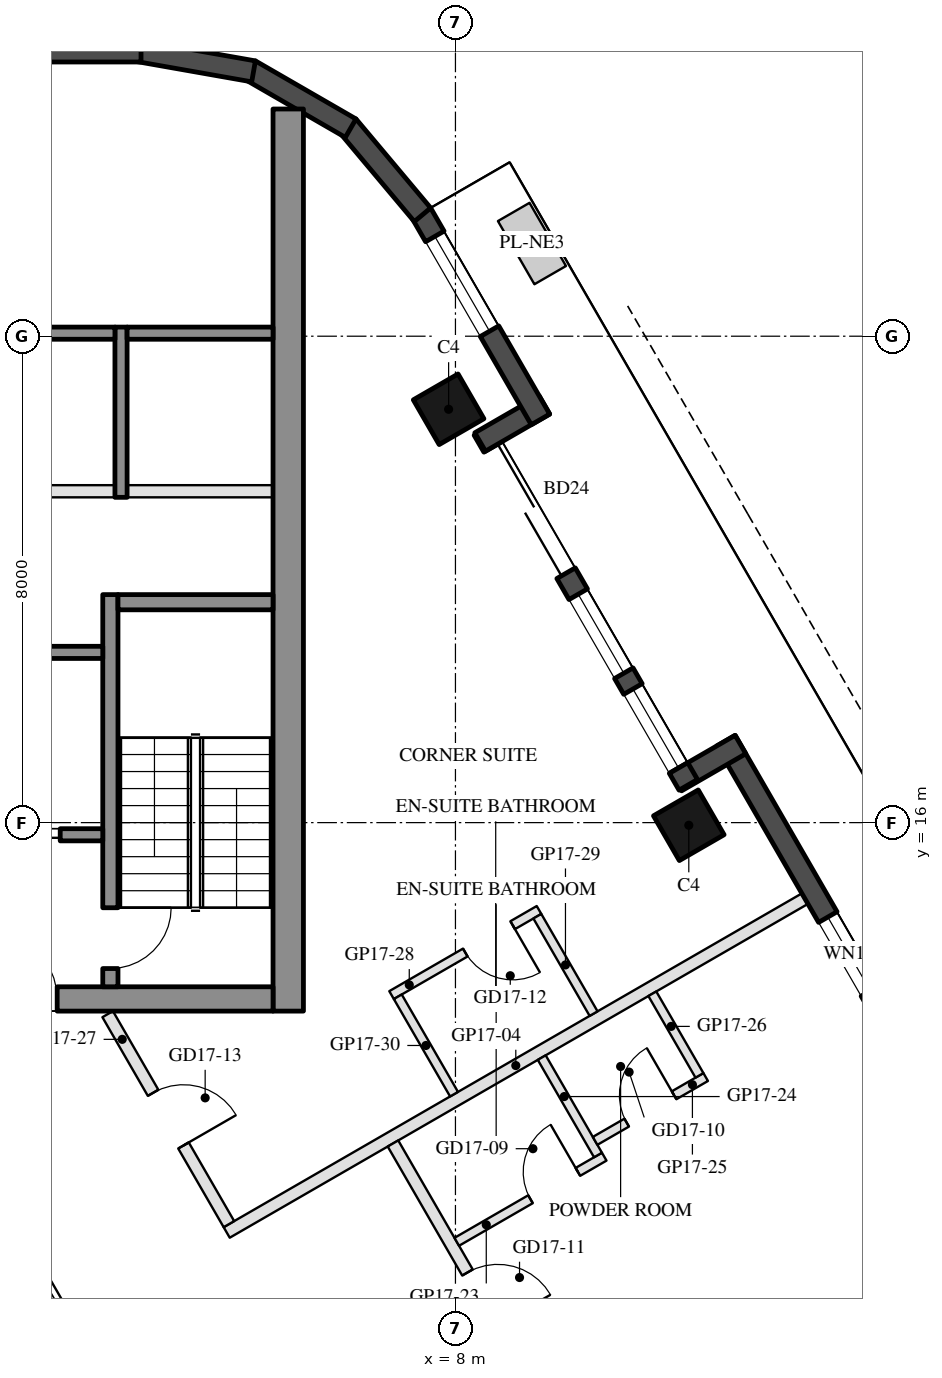
"""IFC4 building model, lengths in metres.
Left out: names, types, materials, properties, quantities, classifications, styles, units other than length and angle.
Written with IfcOpenShell. Run it as: python <this file> out.ifc"""

import sys

from ifc_helpers import new_model, si_unit, direction, frame, frame_2d, origin, origin_2d, place, context, subcontext, project, spatial, rectangle, hollow_rectangle, extrude, element, fill, save


model = new_model("IFC4")
c1 = context("Model", 3, precision=1e-05, world=origin(), true_north=direction((0.0, 1.0)))
c2 = subcontext(c1, "Body", "Model", "MODEL_VIEW")
j1 = project(units=[si_unit("LENGTHUNIT", "METRE"), si_unit("PLANEANGLEUNIT", "RADIAN")], contexts=[c1])
p1 = place(None, origin())
s1 = spatial("IfcSite", under=j1, at=p1, CompositionType="ELEMENT")
p2 = place(p1, origin())
s2 = spatial("IfcBuilding", under=s1, at=p2, CompositionType="ELEMENT")
p3 = place(p2, frame((0.0, 0.0, 183.6)))
s3 = spatial("IfcBuildingStorey", under=s2, at=p3, CompositionType="ELEMENT", Elevation=183.6)
for number, where, z_axis, x_axis in (
    (1, (11.838, 15.957, 0.0), (0.0, 0.0, 1.0), (-0.5, 0.866, 0.0)),
    (2, (7.888, 22.798, 0.0), (0.0, 0.0, 1.0), (-0.5, 0.866, 0.0)),
):
    element("IfcColumn", number, at=place(p3, frame(where, z_axis=z_axis, x_axis=x_axis)), inside=s3, PredefinedType="COLUMN", context=c2, shape_type="SweptSolid", body=[
        extrude(hollow_rectangle(XDim=0.85, YDim=0.85, WallThickness=0.04, at=origin_2d()), origin(), (0.0, 0.0, 1.0), 3.7),
    ])
p4 = place(p3, frame((17.299, 8.948, 0.0), z_axis=(0.0, 0.0, 1.0), x_axis=(-0.500010041276, 0.866019606374, 0.0)))
e3 = element("IfcWall", 3, at=p4, inside=s3, PredefinedType="SOLIDWALL", context=c2, shape_type="SweptSolid", body=[
    extrude(rectangle(XDim=9.7, YDim=0.35, at=frame_2d((4.85, 0.0))), origin(), (0.0, 0.0, 1.0), 3.55),
])
p5 = place(p4, frame((1.675, 0.0, 0.3)))
e4 = element("IfcOpeningElement", 4, at=p5, cuts=e3, PredefinedType="OPENING", context=c2, shape_type="SweptSolid", body=[
    extrude(rectangle(XDim=2.5, YDim=2.65, at=frame_2d((1.25, 1.325))), frame((0.0, 0.185, 0.0), z_axis=(0.0, -1.0, 0.0), x_axis=(1.0, 0.0, 0.0)), (0.0, 0.0, 1.0), 0.37),
])
p6 = place(p4, frame((4.949, 0.0, 0.3)))
e5 = element("IfcOpeningElement", 5, at=p6, cuts=e3, PredefinedType="OPENING", context=c2, shape_type="SweptSolid", body=[
    extrude(rectangle(XDim=1.4, YDim=2.65, at=frame_2d((0.7, 1.325))), frame((0.0, 0.185, 0.0), z_axis=(0.0, -1.0, 0.0), x_axis=(1.0, 0.0, 0.0)), (0.0, 0.0, 1.0), 0.37),
])
p7 = place(p3, frame((12.688, 17.284, 0.0), z_axis=(0.0, 0.0, 1.0), x_axis=(-0.865955602162, -0.500120880472, 0.0)))
e6 = element("IfcWall", 6, at=p7, inside=s3, PredefinedType="SOLIDWALL", context=c2, shape_type="SweptSolid", body=[
    extrude(rectangle(XDim=1.22, YDim=0.35, at=frame_2d((0.61, 0.0))), origin(), (0.0, 0.0, 1.0), 3.55),
])
p8 = place(p3, frame((11.829, 16.621, 0.0), z_axis=(0.0, 0.0, 1.0), x_axis=(-0.500003597184, 0.866023326939, 0.0)))
e7 = element("IfcWall", 7, at=p8, inside=s3, PredefinedType="SOLIDWALL", context=c2, shape_type="SweptSolid", body=[
    extrude(rectangle(XDim=6.74, YDim=0.35, at=frame_2d((3.37, 0.0))), origin(), (0.0, 0.0, 1.0), 3.55),
])
p9 = place(p8, frame((4.02, 0.0, 0.0)))
e8 = element("IfcOpeningElement", 8, at=p9, cuts=e7, PredefinedType="OPENING", context=c2, shape_type="SweptSolid", body=[
    extrude(rectangle(XDim=2.4, YDim=2.4, at=frame_2d((1.2, 1.2))), frame((0.0, 0.185, 0.0), z_axis=(0.0, -1.0, 0.0), x_axis=(1.0, 0.0, 0.0)), (0.0, 0.0, 1.0), 0.37),
])
p10 = place(p8, frame((0.32, 0.0, 0.3)))
e9 = element("IfcOpeningElement", 9, at=p10, cuts=e7, PredefinedType="OPENING", context=c2, shape_type="SweptSolid", body=[
    extrude(rectangle(XDim=1.5, YDim=2.65, at=frame_2d((0.75, 1.325))), frame((0.0, 0.185, 0.0), z_axis=(0.0, -1.0, 0.0), x_axis=(1.0, 0.0, 0.0)), (0.0, 0.0, 1.0), 0.37),
])
p11 = place(p8, frame((2.12, 0.0, 0.3)))
e10 = element("IfcOpeningElement", 10, at=p11, cuts=e7, PredefinedType="OPENING", context=c2, shape_type="SweptSolid", body=[
    extrude(rectangle(XDim=1.5, YDim=2.65, at=frame_2d((0.75, 1.325))), frame((0.0, 0.185, 0.0), z_axis=(0.0, -1.0, 0.0), x_axis=(1.0, 0.0, 0.0)), (0.0, 0.0, 1.0), 0.37),
])
p12 = place(p3, frame((8.406, 22.26, 0.0), z_axis=(0.0, 0.0, 1.0), x_axis=(0.865955602162, 0.500120880472, 0.0)))
e11 = element("IfcWall", 11, at=p12, inside=s3, PredefinedType="SOLIDWALL", context=c2, shape_type="SweptSolid", body=[
    extrude(rectangle(XDim=1.22, YDim=0.35, at=frame_2d((0.61, 0.0))), origin(), (0.0, 0.0, 1.0), 3.55),
])
p13 = place(p3, frame((9.398, 22.631, 0.0), z_axis=(0.0, 0.0, 1.0), x_axis=(-0.499954521343, 0.866051659307, 0.0)))
e12 = element("IfcWall", 12, at=p13, inside=s3, PredefinedType="SOLIDWALL", context=c2, shape_type="SweptSolid", body=[
    extrude(rectangle(XDim=3.916, YDim=0.35, at=frame_2d((1.958, 0.0))), origin(), (0.0, 0.0, 1.0), 3.55),
])
p14 = place(p13, frame((1.675, 0.0, 0.3)))
e13 = element("IfcOpeningElement", 13, at=p14, cuts=e12, PredefinedType="OPENING", context=c2, shape_type="SweptSolid", body=[
    extrude(rectangle(XDim=1.8, YDim=2.65, at=frame_2d((0.9, 1.325))), frame((0.0, 0.185, 0.0), z_axis=(0.0, -1.0, 0.0), x_axis=(1.0, 0.0, 0.0)), (0.0, 0.0, 1.0), 0.37),
])
p15 = place(p3, frame((7.458, 25.998, 0.0), z_axis=(0.0, 0.0, 1.0), x_axis=(-0.642808304945, 0.766027077259, 0.0)))
e14 = element("IfcWall", 14, at=p15, inside=s3, PredefinedType="SOLIDWALL", context=c2, shape_type="SweptSolid", body=[
    extrude(rectangle(XDim=1.91, YDim=0.35, at=frame_2d((0.955, 0.0))), origin(), (0.0, 0.0, 1.0), 3.55),
])
for number, where, z_axis, x_axis in (
    (15, (6.277, 27.422, 0.0), (0.0, 0.0, 1.0), (-0.866, 0.5, 0.0)),
    (16, (4.68, 28.356, 0.0), (0.0, 0.0, 1.0), (-0.985, 0.174, 0.0)),
):
    element("IfcWall", number, at=place(p3, frame(where, z_axis=z_axis, x_axis=x_axis)), inside=s3, PredefinedType="SOLIDWALL", context=c2, shape_type="SweptSolid", body=[
        extrude(rectangle(XDim=1.91, YDim=0.35, at=frame_2d((0.955, 0.0))), origin(), (0.0, 0.0, 1.0), 3.55),
    ])
p16 = place(p3, frame((2.829, 28.685, 0.0), z_axis=(0.0, 0.0, 1.0), x_axis=(-1.0, 0.0, 0.0)))
e17 = element("IfcWall", 17, at=p16, inside=s3, PredefinedType="SOLIDWALL", context=c2, shape_type="SweptSolid", body=[
    extrude(rectangle(XDim=5.658, YDim=0.35, at=frame_2d((2.829, 0.0))), origin(), (0.0, 0.0, 1.0), 3.55),
])
p17 = place(p3, frame((5.25, 12.9, 0.0), z_axis=(0.0, 0.0, 1.0), x_axis=(0.0, 1.0, 0.0)))
e18 = element("IfcWall", 18, at=p17, inside=s3, PredefinedType="SHEAR", context=c2, shape_type="SweptSolid", body=[
    extrude(rectangle(XDim=14.837, YDim=0.5, at=frame_2d((7.418, 0.0))), origin(), (0.0, 0.0, 1.0), 3.5),
])
p18 = place(p3, frame((5.0, 13.1, 0.0), z_axis=(0.0, 0.0, 1.0), x_axis=(-1.0, 0.0, 0.0)))
e19 = element("IfcWall", 19, at=p18, inside=s3, PredefinedType="SHEAR", context=c2, shape_type="SweptSolid", body=[
    extrude(rectangle(XDim=10.0, YDim=0.4, at=frame_2d((5.0, 0.0))), origin(), (0.0, 0.0, 1.0), 3.5),
])
p19 = place(p18, frame((3.55, 0.0, 0.0)))
e20 = element("IfcOpeningElement", 20, at=p19, cuts=e19, PredefinedType="OPENING", context=c2, shape_type="SweptSolid", body=[
    extrude(rectangle(XDim=1.1, YDim=2.1, at=frame_2d((0.55, 1.05))), frame((0.0, 0.21, 0.0), z_axis=(0.0, -1.0, 0.0), x_axis=(1.0, 0.0, 0.0)), (0.0, 0.0, 1.0), 0.42),
])
p20 = place(p18, frame((5.85, 0.0, 0.0)))
e21 = element("IfcOpeningElement", 21, at=p20, cuts=e19, PredefinedType="OPENING", context=c2, shape_type="SweptSolid", body=[
    extrude(rectangle(XDim=1.4, YDim=2.1, at=frame_2d((0.7, 1.05))), frame((0.0, 0.21, 0.0), z_axis=(0.0, -1.0, 0.0), x_axis=(1.0, 0.0, 0.0)), (0.0, 0.0, 1.0), 0.42),
])
p21 = place(p3, frame((2.325, 13.3, 0.0), z_axis=(0.0, 0.0, 1.0), x_axis=(0.0, 1.0, 0.0)))
e22 = element("IfcWall", 22, at=p21, inside=s3, PredefinedType="SHEAR", context=c2, shape_type="SweptSolid", body=[
    extrude(rectangle(XDim=6.45, YDim=0.25, at=frame_2d((3.225, 0.0))), origin(), (0.0, 0.0, 1.0), 3.5),
])
p22 = place(p21, frame((0.3, 0.0, 0.0)))
e23 = element("IfcOpeningElement", 23, at=p22, cuts=e22, PredefinedType="OPENING", context=c2, shape_type="SweptSolid", body=[
    extrude(rectangle(XDim=1.0, YDim=2.1, at=frame_2d((0.5, 1.05))), frame((0.0, 0.135, 0.0), z_axis=(0.0, -1.0, 0.0), x_axis=(1.0, 0.0, 0.0)), (0.0, 0.0, 1.0), 0.27),
])
p23 = place(p3, frame((5.0, 19.625, 0.0), z_axis=(0.0, 0.0, 1.0), x_axis=(-1.0, 0.0, 0.0)))
e24 = element("IfcWall", 24, at=p23, inside=s3, PredefinedType="SHEAR", context=c2, shape_type="SweptSolid", body=[
    extrude(rectangle(XDim=2.55, YDim=0.25, at=frame_2d((1.275, 0.0))), origin(), (0.0, 0.0, 1.0), 3.5),
])
p24 = place(p3, frame((2.2, 18.8, 0.0), z_axis=(0.0, 0.0, 1.0), x_axis=(-1.0, 0.0, 0.0)))
e25 = element("IfcWall", 25, at=p24, inside=s3, PredefinedType="SHEAR", context=c2, shape_type="SweptSolid", body=[
    extrude(rectangle(XDim=2.8, YDim=0.2, at=frame_2d((1.4, 0.0))), origin(), (0.0, 0.0, 1.0), 3.5),
])
p25 = place(p3, frame((2.2, 15.8, 0.0), z_axis=(0.0, 0.0, 1.0), x_axis=(-1.0, 0.0, 0.0)))
e26 = element("IfcWall", 26, at=p25, inside=s3, PredefinedType="SHEAR", context=c2, shape_type="SweptSolid", body=[
    extrude(rectangle(XDim=2.8, YDim=0.2, at=frame_2d((1.4, 0.0))), origin(), (0.0, 0.0, 1.0), 3.5),
])
p26 = place(p25, frame((0.7, 0.0, 0.0)))
e27 = element("IfcOpeningElement", 27, at=p26, cuts=e26, PredefinedType="OPENING", context=c2, shape_type="SweptSolid", body=[
    extrude(rectangle(XDim=1.2, YDim=2.1, at=frame_2d((0.6, 1.05))), frame((0.0, 0.11, 0.0), z_axis=(0.0, -1.0, 0.0), x_axis=(1.0, 0.0, 0.0)), (0.0, 0.0, 1.0), 0.22),
])
p27 = place(p3, frame((2.5, 21.35, 0.0), z_axis=(0.0, 0.0, 1.0), x_axis=(0.0, 1.0, 0.0)))
e28 = element("IfcWall", 28, at=p27, inside=s3, PredefinedType="SHEAR", context=c2, shape_type="SweptSolid", body=[
    extrude(rectangle(XDim=2.8, YDim=0.2, at=frame_2d((1.4, 0.0))), origin(), (0.0, 0.0, 1.0), 3.5),
])
p28 = place(p3, frame((5.0, 24.05, 0.0), z_axis=(0.0, 0.0, 1.0), x_axis=(-1.0, 0.0, 0.0)))
e29 = element("IfcWall", 29, at=p28, inside=s3, PredefinedType="SHEAR", context=c2, shape_type="SweptSolid", body=[
    extrude(rectangle(XDim=2.4, YDim=0.2, at=frame_2d((1.2, 0.0))), origin(), (0.0, 0.0, 1.0), 3.5),
])
p29 = place(p3, frame((2.4, 24.05, 0.0), z_axis=(0.0, 0.0, 1.0), x_axis=(-1.0, 0.0, 0.0)))
e30 = element("IfcWall", 30, at=p29, inside=s3, PredefinedType="SHEAR", context=c2, shape_type="SweptSolid", body=[
    extrude(rectangle(XDim=2.8, YDim=0.2, at=frame_2d((1.4, 0.0))), origin(), (0.0, 0.0, 1.0), 3.5),
])
p30 = place(p3, frame((5.0, 21.45, 0.0), z_axis=(0.0, 0.0, 1.0), x_axis=(-1.0, 0.0, 0.0)))
e31 = element("IfcWall", 31, at=p30, inside=s3, PredefinedType="PARTITIONING", context=c2, shape_type="SweptSolid", body=[
    extrude(rectangle(XDim=2.4, YDim=0.2, at=frame_2d((1.2, 0.0))), origin(), (0.0, 0.0, 1.0), 3.5),
])
p31 = place(p3, frame((2.4, 21.45, 0.0), z_axis=(0.0, 0.0, 1.0), x_axis=(-1.0, 0.0, 0.0)))
e32 = element("IfcWall", 32, at=p31, inside=s3, PredefinedType="PARTITIONING", context=c2, shape_type="SweptSolid", body=[
    extrude(rectangle(XDim=2.8, YDim=0.2, at=frame_2d((1.4, 0.0))), origin(), (0.0, 0.0, 1.0), 3.5),
])
p32 = place(p3, frame((13.747, 14.75, 0.0), z_axis=(0.0, 0.0, 1.0), x_axis=(-0.866027479907, -0.499996404033, 0.0)))
e33 = element("IfcWall", 33, at=p32, inside=s3, PredefinedType="PARTITIONING", context=c2, shape_type="SweptSolid", body=[
    extrude(rectangle(XDim=10.98, YDim=0.2, at=frame_2d((5.49, 0.0))), origin(), (0.0, 0.0, 1.0), 3.06),
])
p33 = place(p3, frame((6.973, 10.723, 0.0), z_axis=(0.0, 0.0, 1.0), x_axis=(0.500000207062, -0.866025284237, 0.0)))
e34 = element("IfcWall", 34, at=p33, inside=s3, PredefinedType="PARTITIONING", context=c2, shape_type="SweptSolid", body=[
    extrude(rectangle(XDim=10.5, YDim=0.2, at=frame_2d((5.25, 0.0))), origin(), (0.0, 0.0, 1.0), 2.95),
])
p34 = place(p33, frame((2.45, 0.0, 0.0)))
e35 = element("IfcOpeningElement", 35, at=p34, cuts=e34, PredefinedType="OPENING", context=c2, shape_type="SweptSolid", body=[
    extrude(rectangle(XDim=1.0, YDim=2.1, at=frame_2d((0.5, 1.05))), frame((0.0, 0.11, 0.0), z_axis=(0.0, -1.0, 0.0), x_axis=(1.0, 0.0, 0.0)), (0.0, 0.0, 1.0), 0.22),
])
p35 = place(p3, frame((8.022, 9.106, 0.0), z_axis=(0.0, 0.0, 1.0), x_axis=(0.866018616679, 0.500011755427, 0.0)))
e36 = element("IfcWall", 36, at=p35, inside=s3, PredefinedType="PARTITIONING", context=c2, shape_type="SweptSolid", body=[
    extrude(rectangle(XDim=2.8, YDim=0.15, at=frame_2d((1.4, 0.0))), origin(), (0.0, 0.0, 1.0), 2.95),
])
p36 = place(p35, frame((1.4, 0.0, 0.0)))
e37 = element("IfcOpeningElement", 37, at=p36, cuts=e36, PredefinedType="OPENING", context=c2, shape_type="SweptSolid", body=[
    extrude(rectangle(XDim=0.9, YDim=2.1, at=frame_2d((0.45, 1.05))), frame((0.0, 0.085, 0.0), z_axis=(0.0, -1.0, 0.0), x_axis=(1.0, 0.0, 0.0)), (0.0, 0.0, 1.0), 0.17),
])
p37 = place(p3, frame((10.344, 10.533, 0.0), z_axis=(0.0, 0.0, 1.0), x_axis=(-0.499985172903, 0.866033964044, 0.0)))
e38 = element("IfcWall", 38, at=p37, inside=s3, PredefinedType="PARTITIONING", context=c2, shape_type="SweptSolid", body=[
    extrude(rectangle(XDim=1.85, YDim=0.15, at=frame_2d((0.925, 0.0))), origin(), (0.0, 0.0, 1.0), 2.95),
])
p38 = place(p3, frame((10.297, 10.766, 0.0), z_axis=(0.0, 0.0, 1.0), x_axis=(0.866009402589, 0.500027713859, 0.0)))
e39 = element("IfcWall", 39, at=p38, inside=s3, PredefinedType="PARTITIONING", context=c2, shape_type="SweptSolid", body=[
    extrude(rectangle(XDim=2.1, YDim=0.15, at=frame_2d((1.05, 0.0))), origin(), (0.0, 0.0, 1.0), 3.55),
])
p39 = place(p38, frame((0.6, 0.0, 0.0)))
e40 = element("IfcOpeningElement", 40, at=p39, cuts=e39, PredefinedType="OPENING", context=c2, shape_type="SweptSolid", body=[
    extrude(rectangle(XDim=0.9, YDim=2.1, at=frame_2d((0.45, 1.05))), frame((0.0, 0.085, 0.0), z_axis=(0.0, -1.0, 0.0), x_axis=(1.0, 0.0, 0.0)), (0.0, 0.0, 1.0), 0.17),
])
p40 = place(p3, frame((12.013, 11.843, 0.0), z_axis=(0.0, 0.0, 1.0), x_axis=(-0.500086022567, 0.865975732936, 0.0)))
e41 = element("IfcWall", 41, at=p40, inside=s3, PredefinedType="PARTITIONING", context=c2, shape_type="SweptSolid", body=[
    extrude(rectangle(XDim=1.55, YDim=0.15, at=frame_2d((0.775, 0.0))), origin(), (0.0, 0.0, 1.0), 3.55),
])
p41 = place(p3, frame((2.281, 12.85, 0.0), z_axis=(0.0, 0.0, 1.0), x_axis=(0.500010364181, -0.866019419939, 0.0)))
e42 = element("IfcWall", 42, at=p41, inside=s3, PredefinedType="PARTITIONING", context=c2, shape_type="SweptSolid", body=[
    extrude(rectangle(XDim=3.988, YDim=0.2, at=frame_2d((1.994, 0.0))), origin(), (0.0, 0.0, 1.0), 2.95),
])
p42 = place(p41, frame((1.494, 0.0, 0.0)))
e43 = element("IfcOpeningElement", 43, at=p42, cuts=e42, PredefinedType="OPENING", context=c2, shape_type="SweptSolid", body=[
    extrude(rectangle(XDim=1.0, YDim=2.1, at=frame_2d((0.5, 1.05))), frame((0.0, 0.11, 0.0), z_axis=(0.0, -1.0, 0.0), x_axis=(1.0, 0.0, 0.0)), (0.0, 0.0, 1.0), 0.22),
])
p43 = place(p3, frame((9.374, 14.563, 0.0), z_axis=(0.0, 0.0, 1.0), x_axis=(-0.866034573852, -0.49998411664, 0.0)))
e44 = element("IfcWall", 44, at=p43, inside=s3, PredefinedType="PARTITIONING", context=c2, shape_type="SweptSolid", body=[
    extrude(rectangle(XDim=2.8, YDim=0.15, at=frame_2d((1.4, 0.0))), origin(), (0.0, 0.0, 1.0), 2.95),
])
p44 = place(p43, frame((0.5, 0.0, 0.0)))
e45 = element("IfcOpeningElement", 45, at=p44, cuts=e44, PredefinedType="OPENING", context=c2, shape_type="SweptSolid", body=[
    extrude(rectangle(XDim=0.9, YDim=2.1, at=frame_2d((0.45, 1.05))), frame((0.0, 0.085, 0.0), z_axis=(0.0, -1.0, 0.0), x_axis=(1.0, 0.0, 0.0)), (0.0, 0.0, 1.0), 0.17),
])
for number, where, z_axis, x_axis in (
    (46, (10.272, 12.859, 0.0), (0.0, 0.0, 1.0), (-0.5, 0.866, 0.0)),
    (47, (7.977, 11.534, 0.0), (0.0, 0.0, 1.0), (-0.5, 0.866, 0.0)),
):
    element("IfcWall", number, at=place(p3, frame(where, z_axis=z_axis, x_axis=x_axis)), inside=s3, PredefinedType="PARTITIONING", context=c2, shape_type="SweptSolid", body=[
        extrude(rectangle(XDim=1.85, YDim=0.15, at=frame_2d((0.925, 0.0))), origin(), (0.0, 0.0, 1.0), 2.95),
    ])
p45 = place(p6, origin())
e48 = element("IfcWindow", 48, at=p45, inside=s3, PartitioningType="SINGLE_PANEL", PredefinedType="WINDOW", context=c2, shape_type="SweptSolid", body=[
    extrude(rectangle(XDim=1.4, YDim=2.65, at=frame_2d((0.7, 1.325))), frame((0.0, 0.03, 0.0), z_axis=(0.0, -1.0, 0.0), x_axis=(1.0, 0.0, 0.0)), (0.0, 0.0, 1.0), 0.06),
])
fill(e5, e48)
p46 = place(p9, frame((2.4, 0.0, 0.0), z_axis=(0.0, 0.0, 1.0), x_axis=(-1.0, 0.0, 0.0)))
e49 = element("IfcDoor", 49, at=p46, inside=s3, OperationType="SLIDING_TO_LEFT", PredefinedType="DOOR", context=c2, shape_type="SweptSolid", body=[
    extrude(rectangle(XDim=2.4, YDim=2.4, at=frame_2d((1.2, 1.2))), frame((0.0, 0.025, 0.0), z_axis=(0.0, -1.0, 0.0), x_axis=(1.0, 0.0, 0.0)), (0.0, 0.0, 1.0), 0.05),
])
fill(e8, e49)
p47 = place(p10, origin())
e50 = element("IfcWindow", 50, at=p47, inside=s3, PartitioningType="SINGLE_PANEL", PredefinedType="WINDOW", context=c2, shape_type="SweptSolid", body=[
    extrude(rectangle(XDim=1.5, YDim=2.65, at=frame_2d((0.75, 1.325))), frame((0.0, 0.03, 0.0), z_axis=(0.0, -1.0, 0.0), x_axis=(1.0, 0.0, 0.0)), (0.0, 0.0, 1.0), 0.06),
])
fill(e9, e50)
p48 = place(p11, origin())
e51 = element("IfcWindow", 51, at=p48, inside=s3, PartitioningType="SINGLE_PANEL", PredefinedType="WINDOW", context=c2, shape_type="SweptSolid", body=[
    extrude(rectangle(XDim=1.5, YDim=2.65, at=frame_2d((0.75, 1.325))), frame((0.0, 0.03, 0.0), z_axis=(0.0, -1.0, 0.0), x_axis=(1.0, 0.0, 0.0)), (0.0, 0.0, 1.0), 0.06),
])
fill(e10, e51)
p49 = place(p14, origin())
e52 = element("IfcWindow", 52, at=p49, inside=s3, PartitioningType="SINGLE_PANEL", PredefinedType="WINDOW", context=c2, shape_type="SweptSolid", body=[
    extrude(rectangle(XDim=1.8, YDim=2.65, at=frame_2d((0.9, 1.325))), frame((0.0, 0.03, 0.0), z_axis=(0.0, -1.0, 0.0), x_axis=(1.0, 0.0, 0.0)), (0.0, 0.0, 1.0), 0.06),
])
fill(e13, e52)
p50 = place(p26, origin())
e53 = element("IfcDoor", 53, at=p50, inside=s3, OperationType="DOUBLE_DOOR_SLIDING", PredefinedType="DOOR", context=c2, shape_type="SweptSolid", body=[
    extrude(rectangle(XDim=1.2, YDim=2.1, at=frame_2d((0.6, 1.05))), frame((0.0, 0.025, 0.0), z_axis=(0.0, -1.0, 0.0), x_axis=(1.0, 0.0, 0.0)), (0.0, 0.0, 1.0), 0.05),
])
fill(e27, e53)
p51 = place(p19, frame((1.1, 0.0, 0.0), z_axis=(0.0, 0.0, 1.0), x_axis=(-1.0, 0.0, 0.0)))
e54 = element("IfcDoor", 54, at=p51, inside=s3, OperationType="SINGLE_SWING_LEFT", PredefinedType="DOOR", context=c2, shape_type="SweptSolid", body=[
    extrude(rectangle(XDim=1.1, YDim=2.1, at=frame_2d((0.55, 1.05))), frame((0.0, 0.025, 0.0), z_axis=(0.0, -1.0, 0.0), x_axis=(1.0, 0.0, 0.0)), (0.0, 0.0, 1.0), 0.05),
])
fill(e20, e54)
p52 = place(p22, frame((1.0, 0.0, 0.0), z_axis=(0.0, 0.0, 1.0), x_axis=(-1.0, 0.0, 0.0)))
e55 = element("IfcDoor", 55, at=p52, inside=s3, OperationType="SINGLE_SWING_LEFT", PredefinedType="DOOR", context=c2, shape_type="SweptSolid", body=[
    extrude(rectangle(XDim=1.0, YDim=2.1, at=frame_2d((0.5, 1.05))), frame((0.0, 0.025, 0.0), z_axis=(0.0, -1.0, 0.0), x_axis=(1.0, 0.0, 0.0)), (0.0, 0.0, 1.0), 0.05),
])
fill(e23, e55)
p53 = place(p36, origin())
e56 = element("IfcDoor", 56, at=p53, inside=s3, OperationType="SINGLE_SWING_RIGHT", PredefinedType="DOOR", context=c2, shape_type="SweptSolid", body=[
    extrude(rectangle(XDim=0.9, YDim=2.1, at=frame_2d((0.45, 1.05))), frame((0.0, 0.025, 0.0), z_axis=(0.0, -1.0, 0.0), x_axis=(1.0, 0.0, 0.0)), (0.0, 0.0, 1.0), 0.05),
])
fill(e37, e56)
p54 = place(p39, origin())
e57 = element("IfcDoor", 57, at=p54, inside=s3, OperationType="SINGLE_SWING_RIGHT", PredefinedType="DOOR", context=c2, shape_type="SweptSolid", body=[
    extrude(rectangle(XDim=0.9, YDim=2.1, at=frame_2d((0.45, 1.05))), frame((0.0, 0.025, 0.0), z_axis=(0.0, -1.0, 0.0), x_axis=(1.0, 0.0, 0.0)), (0.0, 0.0, 1.0), 0.05),
])
fill(e40, e57)
p55 = place(p34, origin())
e58 = element("IfcDoor", 58, at=p55, inside=s3, OperationType="SINGLE_SWING_RIGHT", PredefinedType="DOOR", context=c2, shape_type="SweptSolid", body=[
    extrude(rectangle(XDim=1.0, YDim=2.1, at=frame_2d((0.5, 1.05))), frame((0.0, 0.025, 0.0), z_axis=(0.0, -1.0, 0.0), x_axis=(1.0, 0.0, 0.0)), (0.0, 0.0, 1.0), 0.05),
])
fill(e35, e58)
p56 = place(p44, origin())
e59 = element("IfcDoor", 59, at=p56, inside=s3, OperationType="SINGLE_SWING_LEFT", PredefinedType="DOOR", context=c2, shape_type="SweptSolid", body=[
    extrude(rectangle(XDim=0.9, YDim=2.1, at=frame_2d((0.45, 1.05))), frame((0.0, 0.025, 0.0), z_axis=(0.0, -1.0, 0.0), x_axis=(1.0, 0.0, 0.0)), (0.0, 0.0, 1.0), 0.05),
])
fill(e45, e59)
p57 = place(p42, origin())
e60 = element("IfcDoor", 60, at=p57, inside=s3, OperationType="SINGLE_SWING_RIGHT", PredefinedType="DOOR", context=c2, shape_type="SweptSolid", body=[
    extrude(rectangle(XDim=1.0, YDim=2.1, at=frame_2d((0.5, 1.05))), frame((0.0, 0.025, 0.0), z_axis=(0.0, -1.0, 0.0), x_axis=(1.0, 0.0, 0.0)), (0.0, 0.0, 1.0), 0.05),
])
fill(e43, e60)
save(model, sys.argv[1])
